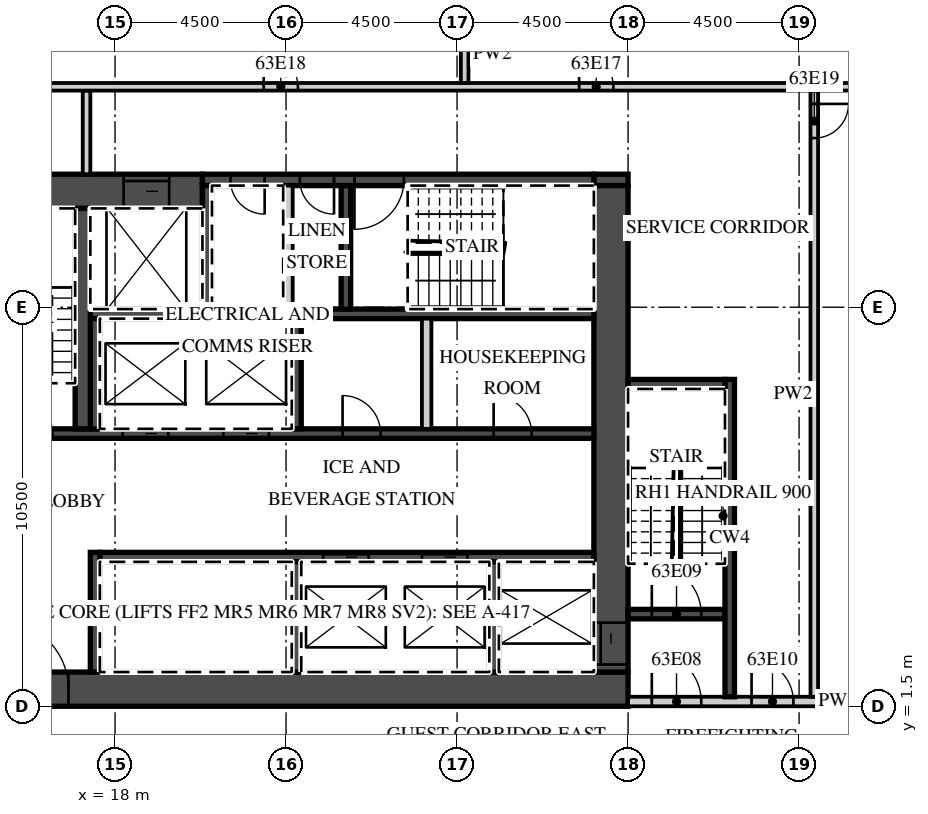
"""IFC4 building model, lengths in metres.
Left out: names, types, materials, properties, quantities, classifications, styles, units other than length and angle.
Written with IfcOpenShell. Run it as: python <this file> out.ifc"""

import sys

from ifc_helpers import new_model, si_unit, direction, frame, frame_2d, origin, place, context, subcontext, project, spatial, rectangle, extrude, element, fill, save


model = new_model("IFC4")
c1 = context("Model", 3, precision=1e-05, world=origin(), true_north=direction((0.0, 1.0)))
c2 = subcontext(c1, "Body", "Model", "MODEL_VIEW")
j1 = project(units=[si_unit("LENGTHUNIT", "METRE"), si_unit("PLANEANGLEUNIT", "RADIAN")], contexts=[c1])
p1 = place(None, origin())
s1 = spatial("IfcSite", under=j1, at=p1, CompositionType="ELEMENT")
p2 = place(p1, origin())
s2 = spatial("IfcBuilding", under=s1, at=p2, CompositionType="ELEMENT")
p3 = place(p2, frame((0.0, 0.0, 254.0)))
s3 = spatial("IfcBuildingStorey", under=s2, at=p3, CompositionType="ELEMENT", Elevation=254.0)
p4 = place(p3, frame((13.5, 1.95, 0.0), z_axis=(0.0, 0.0, 1.0), x_axis=(1.0, 0.0, 0.0)))
e1 = element("IfcWall", 1, at=p4, inside=s3, PredefinedType="SHEAR", context=c2, shape_type="SweptSolid", body=[
    extrude(rectangle(XDim=18.0, YDim=0.9, at=frame_2d((9.0, 0.0))), origin(), (0.0, 0.0, 1.0), 3.0),
])
p5 = place(p4, frame((1.475, 0.0, 0.0)))
e2 = element("IfcOpeningElement", 2, at=p5, cuts=e1, PredefinedType="OPENING", context=c2, shape_type="SweptSolid", body=[
    extrude(rectangle(XDim=1.8, YDim=2.1, at=frame_2d((0.9, 1.05))), frame((0.0, 0.46, 0.0), z_axis=(0.0, -1.0, 0.0), x_axis=(1.0, 0.0, 0.0)), (0.0, 0.0, 1.0), 0.92),
])
p6 = place(p3, frame((13.5, 15.05, 0.0), z_axis=(0.0, 0.0, 1.0), x_axis=(1.0, 0.0, 0.0)))
e3 = element("IfcWall", 3, at=p6, inside=s3, PredefinedType="SHEAR", context=c2, shape_type="SweptSolid", body=[
    extrude(rectangle(XDim=6.8, YDim=0.9, at=frame_2d((3.4, 0.0))), origin(), (0.0, 0.0, 1.0), 3.0),
])
p7 = place(p6, frame((4.725, 0.0, 0.0)))
e4 = element("IfcOpeningElement", 4, at=p7, cuts=e3, PredefinedType="OPENING", context=c2, shape_type="SweptSolid", body=[
    extrude(rectangle(XDim=1.2, YDim=2.1, at=frame_2d((0.6, 1.05))), frame((0.0, 0.46, 0.0), z_axis=(0.0, -1.0, 0.0), x_axis=(1.0, 0.0, 0.0)), (0.0, 0.0, 1.0), 0.92),
])
p8 = place(p3, frame((30.6, 15.35, 0.0), z_axis=(0.0, 0.0, 1.0), x_axis=(1.0, 0.0, 0.0)))
e5 = element("IfcWall", 5, at=p8, inside=s3, PredefinedType="SHEAR", context=c2, shape_type="SweptSolid", body=[
    extrude(rectangle(XDim=0.9, YDim=0.3, at=frame_2d((0.45, 0.0))), origin(), (0.0, 0.0, 1.0), 3.0),
])
p9 = place(p3, frame((20.3, 15.35, 0.0), z_axis=(0.0, 0.0, 1.0), x_axis=(1.0, 0.0, 0.0)))
e6 = element("IfcWall", 6, at=p9, inside=s3, PredefinedType="SHEAR", context=c2, shape_type="SweptSolid", body=[
    extrude(rectangle(XDim=10.3, YDim=0.3, at=frame_2d((5.15, 0.0))), origin(), (0.0, 0.0, 1.0), 3.0),
])
p10 = place(p9, frame((4.0, 0.0, 0.0)))
e7 = element("IfcOpeningElement", 7, at=p10, cuts=e6, PredefinedType="OPENING", context=c2, shape_type="SweptSolid", body=[
    extrude(rectangle(XDim=1.3, YDim=2.1, at=frame_2d((0.65, 1.05))), frame((0.0, 0.16, 0.0), z_axis=(0.0, -1.0, 0.0), x_axis=(1.0, 0.0, 0.0)), (0.0, 0.0, 1.0), 0.32),
])
p11 = place(p9, frame((2.562, 0.0, 0.0)))
e8 = element("IfcOpeningElement", 8, at=p11, cuts=e6, PredefinedType="OPENING", context=c2, shape_type="SweptSolid", body=[
    extrude(rectangle(XDim=0.9, YDim=2.1, at=frame_2d((0.45, 1.05))), frame((0.0, 0.16, 0.0), z_axis=(0.0, -1.0, 0.0), x_axis=(1.0, 0.0, 0.0)), (0.0, 0.0, 1.0), 0.32),
])
p12 = place(p9, frame((0.738, 0.0, 0.0)))
e9 = element("IfcOpeningElement", 9, at=p12, cuts=e6, PredefinedType="OPENING", context=c2, shape_type="SweptSolid", body=[
    extrude(rectangle(XDim=0.9, YDim=2.1, at=frame_2d((0.45, 1.05))), frame((0.0, 0.16, 0.0), z_axis=(0.0, -1.0, 0.0), x_axis=(1.0, 0.0, 0.0)), (0.0, 0.0, 1.0), 0.32),
])
p13 = place(p3, frame((31.05, 2.4, 0.0), z_axis=(0.0, 0.0, 1.0), x_axis=(0.0, 1.0, 0.0)))
e10 = element("IfcWall", 10, at=p13, inside=s3, PredefinedType="SHEAR", context=c2, shape_type="SweptSolid", body=[
    extrude(rectangle(XDim=12.8, YDim=0.9, at=frame_2d((6.4, 0.0))), origin(), (0.0, 0.0, 1.0), 3.0),
])
p14 = place(p13, frame((0.2, 0.0, 0.0)))
e11 = element("IfcOpeningElement", 11, at=p14, cuts=e10, PredefinedType="OPENING", context=c2, shape_type="SweptSolid", body=[
    extrude(rectangle(XDim=1.1, YDim=2.1, at=frame_2d((0.55, 1.05))), frame((0.0, 0.46, 0.0), z_axis=(0.0, -1.0, 0.0), x_axis=(1.0, 0.0, 0.0)), (0.0, 0.0, 1.0), 0.92),
])
p15 = place(p3, frame((17.6, 5.425, 0.0), z_axis=(0.0, 0.0, 1.0), x_axis=(1.0, 0.0, 0.0)))
e12 = element("IfcWall", 12, at=p15, inside=s3, PredefinedType="SHEAR", context=c2, shape_type="SweptSolid", body=[
    extrude(rectangle(XDim=13.0, YDim=0.25, at=frame_2d((6.5, 0.0))), origin(), (0.0, 0.0, 1.0), 3.0),
])
p16 = place(p15, frame((8.475, 0.0, 0.0)))
e13 = element("IfcOpeningElement", 13, at=p16, cuts=e12, PredefinedType="OPENING", context=c2, shape_type="SweptSolid", body=[
    extrude(rectangle(XDim=1.2, YDim=2.1, at=frame_2d((0.6, 1.05))), frame((0.0, 0.135, 0.0), z_axis=(0.0, -1.0, 0.0), x_axis=(1.0, 0.0, 0.0)), (0.0, 0.0, 1.0), 0.27),
])
p17 = place(p15, frame((5.875, 0.0, 0.0)))
e14 = element("IfcOpeningElement", 14, at=p17, cuts=e12, PredefinedType="OPENING", context=c2, shape_type="SweptSolid", body=[
    extrude(rectangle(XDim=1.2, YDim=2.1, at=frame_2d((0.6, 1.05))), frame((0.0, 0.135, 0.0), z_axis=(0.0, -1.0, 0.0), x_axis=(1.0, 0.0, 0.0)), (0.0, 0.0, 1.0), 0.27),
])
p18 = place(p3, frame((17.475, 2.4, 0.0), z_axis=(0.0, 0.0, 1.0), x_axis=(0.0, 1.0, 0.0)))
e15 = element("IfcWall", 15, at=p18, inside=s3, PredefinedType="SHEAR", context=c2, shape_type="SweptSolid", body=[
    extrude(rectangle(XDim=3.15, YDim=0.25, at=frame_2d((1.575, 0.0))), origin(), (0.0, 0.0, 1.0), 3.0),
])
for number, where, z_axis, x_axis in (
    (16, (27.975, 2.4, 0.0), (0.0, 0.0, 1.0), (0.0, 1.0, 0.0)),
    (17, (22.775, 2.4, 0.0), (0.0, 0.0, 1.0), (0.0, 1.0, 0.0)),
):
    element("IfcWall", number, at=place(p3, frame(where, z_axis=z_axis, x_axis=x_axis)), inside=s3, PredefinedType="SHEAR", context=c2, shape_type="SweptSolid", body=[
        extrude(rectangle(XDim=2.9, YDim=0.25, at=frame_2d((1.45, 0.0))), origin(), (0.0, 0.0, 1.0), 3.0),
    ])
p19 = place(p3, frame((14.4, 8.675, 0.0), z_axis=(0.0, 0.0, 1.0), x_axis=(1.0, 0.0, 0.0)))
e18 = element("IfcWall", 18, at=p19, inside=s3, PredefinedType="SHEAR", context=c2, shape_type="SweptSolid", body=[
    extrude(rectangle(XDim=16.2, YDim=0.25, at=frame_2d((8.1, 0.0))), origin(), (0.0, 0.0, 1.0), 3.0),
])
p20 = place(p19, frame((6.45, 0.0, 0.0)))
e19 = element("IfcOpeningElement", 19, at=p20, cuts=e18, PredefinedType="OPENING", context=c2, shape_type="SweptSolid", body=[
    extrude(rectangle(XDim=1.2, YDim=2.1, at=frame_2d((0.6, 1.05))), frame((0.0, 0.135, 0.0), z_axis=(0.0, -1.0, 0.0), x_axis=(1.0, 0.0, 0.0)), (0.0, 0.0, 1.0), 0.27),
])
p21 = place(p19, frame((3.8, 0.0, 0.0)))
e20 = element("IfcOpeningElement", 20, at=p21, cuts=e18, PredefinedType="OPENING", context=c2, shape_type="SweptSolid", body=[
    extrude(rectangle(XDim=1.2, YDim=2.1, at=frame_2d((0.6, 1.05))), frame((0.0, 0.135, 0.0), z_axis=(0.0, -1.0, 0.0), x_axis=(1.0, 0.0, 0.0)), (0.0, 0.0, 1.0), 0.27),
])
p22 = place(p19, frame((0.65, 0.0, 0.0)))
e21 = element("IfcOpeningElement", 21, at=p22, cuts=e18, PredefinedType="OPENING", context=c2, shape_type="SweptSolid", body=[
    extrude(rectangle(XDim=1.3, YDim=2.1, at=frame_2d((0.65, 1.05))), frame((0.0, 0.135, 0.0), z_axis=(0.0, -1.0, 0.0), x_axis=(1.0, 0.0, 0.0)), (0.0, 0.0, 1.0), 0.27),
])
p23 = place(p19, frame((13.562, 0.0, 0.0)))
e22 = element("IfcOpeningElement", 22, at=p23, cuts=e18, PredefinedType="OPENING", context=c2, shape_type="SweptSolid", body=[
    extrude(rectangle(XDim=1.0, YDim=2.1, at=frame_2d((0.5, 1.05))), frame((0.0, 0.135, 0.0), z_axis=(0.0, -1.0, 0.0), x_axis=(1.0, 0.0, 0.0)), (0.0, 0.0, 1.0), 0.27),
])
p24 = place(p19, frame((9.587, 0.0, 0.0)))
e23 = element("IfcOpeningElement", 23, at=p24, cuts=e18, PredefinedType="OPENING", context=c2, shape_type="SweptSolid", body=[
    extrude(rectangle(XDim=1.0, YDim=2.1, at=frame_2d((0.5, 1.05))), frame((0.0, 0.135, 0.0), z_axis=(0.0, -1.0, 0.0), x_axis=(1.0, 0.0, 0.0)), (0.0, 0.0, 1.0), 0.27),
])
p25 = place(p3, frame((17.35, 11.825, 0.0), z_axis=(0.0, 0.0, 1.0), x_axis=(1.0, 0.0, 0.0)))
e24 = element("IfcWall", 24, at=p25, inside=s3, PredefinedType="SHEAR", context=c2, shape_type="SweptSolid", body=[
    extrude(rectangle(XDim=13.25, YDim=0.25, at=frame_2d((6.625, 0.0))), origin(), (0.0, 0.0, 1.0), 3.0),
])
for number, where, z_axis, x_axis in (
    (25, (17.475, 8.8, 0.0), (0.0, 0.0, 1.0), (0.0, 1.0, 0.0)),
    (26, (22.775, 8.8, 0.0), (0.0, 0.0, 1.0), (0.0, 1.0, 0.0)),
):
    element("IfcWall", number, at=place(p3, frame(where, z_axis=z_axis, x_axis=x_axis)), inside=s3, PredefinedType="SHEAR", context=c2, shape_type="SweptSolid", body=[
        extrude(rectangle(XDim=2.9, YDim=0.25, at=frame_2d((1.45, 0.0))), origin(), (0.0, 0.0, 1.0), 3.0),
    ])
p26 = place(p3, frame((26.2, 8.8, 0.0), z_axis=(0.0, 0.0, 1.0), x_axis=(0.0, 1.0, 0.0)))
e27 = element("IfcWall", 27, at=p26, inside=s3, PredefinedType="PARTITIONING", context=c2, shape_type="SweptSolid", body=[
    extrude(rectangle(XDim=2.9, YDim=0.25, at=frame_2d((1.45, 0.0))), origin(), (0.0, 0.0, 1.0), 3.0),
])
p27 = place(p3, frame((17.15, 8.8, 0.0), z_axis=(0.0, 0.0, 1.0), x_axis=(0.0, 1.0, 0.0)))
e28 = element("IfcWall", 28, at=p27, inside=s3, PredefinedType="SHEAR", context=c2, shape_type="SweptSolid", body=[
    extrude(rectangle(XDim=5.8, YDim=0.4, at=frame_2d((2.9, 0.0))), origin(), (0.0, 0.0, 1.0), 3.0),
])
for number, where, z_axis, x_axis in (
    (29, (20.425, 11.95, 0.0), (0.0, 0.0, 1.0), (0.0, 1.0, 0.0)),
    (30, (24.075, 11.95, 0.0), (0.0, 0.0, 1.0), (0.0, 1.0, 0.0)),
):
    element("IfcWall", number, at=place(p3, frame(where, z_axis=z_axis, x_axis=x_axis)), inside=s3, PredefinedType="SHEAR", context=c2, shape_type="SweptSolid", body=[
        extrude(rectangle(XDim=3.25, YDim=0.25, at=frame_2d((1.625, 0.0))), origin(), (0.0, 0.0, 1.0), 3.0),
    ])
p28 = place(p3, frame((22.55, 11.95, 0.0), z_axis=(0.0, 0.0, 1.0), x_axis=(0.0, 1.0, 0.0)))
e31 = element("IfcWall", 31, at=p28, inside=s3, PredefinedType="PARTITIONING", context=c2, shape_type="SweptSolid", body=[
    extrude(rectangle(XDim=3.25, YDim=0.25, at=frame_2d((1.625, 0.0))), origin(), (0.0, 0.0, 1.0), 3.0),
])
p29 = place(p3, frame((31.5, 1.625, 0.0), z_axis=(0.0, 0.0, 1.0), x_axis=(1.0, 0.0, 0.0)))
e32 = element("IfcWall", 32, at=p29, inside=s3, PredefinedType="PARTITIONING", context=c2, shape_type="SweptSolid", body=[
    extrude(rectangle(XDim=11.04, YDim=0.25, at=frame_2d((5.52, 0.0))), origin(), (0.0, 0.0, 1.0), 3.0),
])
p30 = place(p29, frame((0.625, 0.0, 0.0)))
e33 = element("IfcOpeningElement", 33, at=p30, cuts=e32, PredefinedType="OPENING", context=c2, shape_type="SweptSolid", body=[
    extrude(rectangle(XDim=1.3, YDim=2.1, at=frame_2d((0.65, 1.05))), frame((0.0, 0.135, 0.0), z_axis=(0.0, -1.0, 0.0), x_axis=(1.0, 0.0, 0.0)), (0.0, 0.0, 1.0), 0.27),
])
p31 = place(p29, frame((3.25, 0.0, 0.0)))
e34 = element("IfcOpeningElement", 34, at=p31, cuts=e32, PredefinedType="OPENING", context=c2, shape_type="SweptSolid", body=[
    extrude(rectangle(XDim=1.1, YDim=2.1, at=frame_2d((0.55, 1.05))), frame((0.0, 0.135, 0.0), z_axis=(0.0, -1.0, 0.0), x_axis=(1.0, 0.0, 0.0)), (0.0, 0.0, 1.0), 0.27),
])
p32 = place(p3, frame((31.5, 3.925, 0.0), z_axis=(0.0, 0.0, 1.0), x_axis=(1.0, 0.0, 0.0)))
e35 = element("IfcWall", 35, at=p32, inside=s3, PredefinedType="SHEAR", context=c2, shape_type="SweptSolid", body=[
    extrude(rectangle(XDim=2.55, YDim=0.25, at=frame_2d((1.275, 0.0))), origin(), (0.0, 0.0, 1.0), 3.0),
])
p33 = place(p32, frame((0.625, 0.0, 0.0)))
e36 = element("IfcOpeningElement", 36, at=p33, cuts=e35, PredefinedType="OPENING", context=c2, shape_type="SweptSolid", body=[
    extrude(rectangle(XDim=1.3, YDim=2.1, at=frame_2d((0.65, 1.05))), frame((0.0, 0.135, 0.0), z_axis=(0.0, -1.0, 0.0), x_axis=(1.0, 0.0, 0.0)), (0.0, 0.0, 1.0), 0.27),
])
p34 = place(p3, frame((34.175, 1.75, 0.0), z_axis=(0.0, 0.0, 1.0), x_axis=(0.0, 1.0, 0.0)))
e37 = element("IfcWall", 37, at=p34, inside=s3, PredefinedType="SHEAR", context=c2, shape_type="SweptSolid", body=[
    extrude(rectangle(XDim=8.35, YDim=0.25, at=frame_2d((4.175, 0.0))), origin(), (0.0, 0.0, 1.0), 3.0),
])
p35 = place(p3, frame((31.5, 9.975, 0.0), z_axis=(0.0, 0.0, 1.0), x_axis=(1.0, 0.0, 0.0)))
e38 = element("IfcWall", 38, at=p35, inside=s3, PredefinedType="SHEAR", context=c2, shape_type="SweptSolid", body=[
    extrude(rectangle(XDim=2.55, YDim=0.25, at=frame_2d((1.275, 0.0))), origin(), (0.0, 0.0, 1.0), 3.0),
])
p36 = place(p3, frame((17.25, 15.5, 0.0), z_axis=(0.0, 0.0, 1.0), x_axis=(0.0, 1.0, 0.0)))
e39 = element("IfcWall", 39, at=p36, inside=s3, PredefinedType="PARTITIONING", context=c2, shape_type="SweptSolid", body=[
    extrude(rectangle(XDim=2.2, YDim=0.2, at=frame_2d((1.1, 0.0))), origin(), (0.0, 0.0, 1.0), 3.0),
])
p37 = place(p3, frame((36.4, 1.75, 0.0), z_axis=(0.0, 0.0, 1.0), x_axis=(0.0, 1.0, 0.0)))
e40 = element("IfcWall", 40, at=p37, inside=s3, PredefinedType="PARTITIONING", context=c2, shape_type="SweptSolid", body=[
    extrude(rectangle(XDim=15.95, YDim=0.2, at=frame_2d((7.975, 0.0))), origin(), (0.0, 0.0, 1.0), 3.0),
])
p38 = place(p37, frame((14.7, 0.0, 0.0)))
e41 = element("IfcOpeningElement", 41, at=p38, cuts=e40, PredefinedType="OPENING", context=c2, shape_type="SweptSolid", body=[
    extrude(rectangle(XDim=0.9, YDim=2.1, at=frame_2d((0.45, 1.05))), frame((0.0, 0.11, 0.0), z_axis=(0.0, -1.0, 0.0), x_axis=(1.0, 0.0, 0.0)), (0.0, 0.0, 1.0), 0.22),
])
p39 = place(p3, frame((13.6, 17.8, 0.0), z_axis=(0.0, 0.0, 1.0), x_axis=(1.0, 0.0, 0.0)))
e42 = element("IfcWall", 42, at=p39, inside=s3, PredefinedType="PARTITIONING", context=c2, shape_type="SweptSolid", body=[
    extrude(rectangle(XDim=28.657, YDim=0.2, at=frame_2d((14.329, 0.0))), origin(), (0.0, 0.0, 1.0), 3.0),
])
p40 = place(p39, frame((16.613, 0.0, 0.0)))
e43 = element("IfcOpeningElement", 43, at=p40, cuts=e42, PredefinedType="OPENING", context=c2, shape_type="SweptSolid", body=[
    extrude(rectangle(XDim=0.9, YDim=2.1, at=frame_2d((0.45, 1.05))), frame((0.0, 0.11, 0.0), z_axis=(0.0, -1.0, 0.0), x_axis=(1.0, 0.0, 0.0)), (0.0, 0.0, 1.0), 0.22),
])
p41 = place(p39, frame((8.312, 0.0, 0.0)))
e44 = element("IfcOpeningElement", 44, at=p41, cuts=e42, PredefinedType="OPENING", context=c2, shape_type="SweptSolid", body=[
    extrude(rectangle(XDim=0.9, YDim=2.1, at=frame_2d((0.45, 1.05))), frame((0.0, 0.11, 0.0), z_axis=(0.0, -1.0, 0.0), x_axis=(1.0, 0.0, 0.0)), (0.0, 0.0, 1.0), 0.22),
])
p42 = place(p3, frame((27.2, 17.9, 0.0), z_axis=(0.0, 0.0, 1.0), x_axis=(0.0, 1.0, 0.0)))
e45 = element("IfcWall", 45, at=p42, inside=s3, PredefinedType="PARTITIONING", context=c2, shape_type="SweptSolid", body=[
    extrude(rectangle(XDim=3.276, YDim=0.2, at=frame_2d((1.638, 0.0))), origin(), (0.0, 0.0, 1.0), 3.0),
])
p43 = place(p20, origin())
e46 = element("IfcDoor", 46, at=p43, inside=s3, OperationType="SLIDING_TO_LEFT", PredefinedType="DOOR", context=c2, shape_type="SweptSolid", body=[
    extrude(rectangle(XDim=1.2, YDim=2.1, at=frame_2d((0.6, 1.05))), frame((0.0, 0.025, 0.0), z_axis=(0.0, -1.0, 0.0), x_axis=(1.0, 0.0, 0.0)), (0.0, 0.0, 1.0), 0.05),
])
fill(e19, e46)
p44 = place(p21, origin())
e47 = element("IfcDoor", 47, at=p44, inside=s3, OperationType="SLIDING_TO_RIGHT", PredefinedType="DOOR", context=c2, shape_type="SweptSolid", body=[
    extrude(rectangle(XDim=1.2, YDim=2.1, at=frame_2d((0.6, 1.05))), frame((0.0, 0.025, 0.0), z_axis=(0.0, -1.0, 0.0), x_axis=(1.0, 0.0, 0.0)), (0.0, 0.0, 1.0), 0.05),
])
fill(e20, e47)
p45 = place(p16, origin())
e48 = element("IfcDoor", 48, at=p45, inside=s3, OperationType="SLIDING_TO_LEFT", PredefinedType="DOOR", context=c2, shape_type="SweptSolid", body=[
    extrude(rectangle(XDim=1.2, YDim=2.1, at=frame_2d((0.6, 1.05))), frame((0.0, 0.025, 0.0), z_axis=(0.0, -1.0, 0.0), x_axis=(1.0, 0.0, 0.0)), (0.0, 0.0, 1.0), 0.05),
])
fill(e13, e48)
p46 = place(p17, origin())
e49 = element("IfcDoor", 49, at=p46, inside=s3, OperationType="SLIDING_TO_RIGHT", PredefinedType="DOOR", context=c2, shape_type="SweptSolid", body=[
    extrude(rectangle(XDim=1.2, YDim=2.1, at=frame_2d((0.6, 1.05))), frame((0.0, 0.025, 0.0), z_axis=(0.0, -1.0, 0.0), x_axis=(1.0, 0.0, 0.0)), (0.0, 0.0, 1.0), 0.05),
])
fill(e14, e49)
p47 = place(p7, origin())
e50 = element("IfcDoor", 50, at=p47, inside=s3, OperationType="SLIDING_TO_LEFT", PredefinedType="DOOR", context=c2, shape_type="SweptSolid", body=[
    extrude(rectangle(XDim=1.2, YDim=2.1, at=frame_2d((0.6, 1.05))), frame((0.0, 0.025, 0.0), z_axis=(0.0, -1.0, 0.0), x_axis=(1.0, 0.0, 0.0)), (0.0, 0.0, 1.0), 0.05),
])
fill(e4, e50)
p48 = place(p14, origin())
e51 = element("IfcDoor", 51, at=p48, inside=s3, OperationType="SLIDING_TO_LEFT", PredefinedType="DOOR", context=c2, shape_type="SweptSolid", body=[
    extrude(rectangle(XDim=1.1, YDim=2.1, at=frame_2d((0.55, 1.05))), frame((0.0, 0.025, 0.0), z_axis=(0.0, -1.0, 0.0), x_axis=(1.0, 0.0, 0.0)), (0.0, 0.0, 1.0), 0.05),
])
fill(e11, e51)
p49 = place(p5, origin())
e52 = element("IfcDoor", 52, at=p49, inside=s3, OperationType="DOUBLE_DOOR_DOUBLE_SWING", PredefinedType="DOOR", context=c2, shape_type="SweptSolid", body=[
    extrude(rectangle(XDim=1.8, YDim=2.1, at=frame_2d((0.9, 1.05))), frame((0.0, 0.025, 0.0), z_axis=(0.0, -1.0, 0.0), x_axis=(1.0, 0.0, 0.0)), (0.0, 0.0, 1.0), 0.05),
])
fill(e2, e52)
p50 = place(p30, origin())
e53 = element("IfcDoor", 53, at=p50, inside=s3, OperationType="SINGLE_SWING_LEFT", PredefinedType="DOOR", context=c2, shape_type="SweptSolid", body=[
    extrude(rectangle(XDim=1.3, YDim=2.1, at=frame_2d((0.65, 1.05))), frame((0.0, 0.025, 0.0), z_axis=(0.0, -1.0, 0.0), x_axis=(1.0, 0.0, 0.0)), (0.0, 0.0, 1.0), 0.05),
])
fill(e33, e53)
p51 = place(p33, origin())
e54 = element("IfcDoor", 54, at=p51, inside=s3, OperationType="SINGLE_SWING_LEFT", PredefinedType="DOOR", context=c2, shape_type="SweptSolid", body=[
    extrude(rectangle(XDim=1.3, YDim=2.1, at=frame_2d((0.65, 1.05))), frame((0.0, 0.025, 0.0), z_axis=(0.0, -1.0, 0.0), x_axis=(1.0, 0.0, 0.0)), (0.0, 0.0, 1.0), 0.05),
])
fill(e36, e54)
p52 = place(p31, origin())
e55 = element("IfcDoor", 55, at=p52, inside=s3, OperationType="SINGLE_SWING_LEFT", PredefinedType="DOOR", context=c2, shape_type="SweptSolid", body=[
    extrude(rectangle(XDim=1.1, YDim=2.1, at=frame_2d((0.55, 1.05))), frame((0.0, 0.025, 0.0), z_axis=(0.0, -1.0, 0.0), x_axis=(1.0, 0.0, 0.0)), (0.0, 0.0, 1.0), 0.05),
])
fill(e34, e55)
p53 = place(p10, origin())
e56 = element("IfcDoor", 56, at=p53, inside=s3, OperationType="SINGLE_SWING_LEFT", PredefinedType="DOOR", context=c2, shape_type="SweptSolid", body=[
    extrude(rectangle(XDim=1.3, YDim=2.1, at=frame_2d((0.65, 1.05))), frame((0.0, 0.025, 0.0), z_axis=(0.0, -1.0, 0.0), x_axis=(1.0, 0.0, 0.0)), (0.0, 0.0, 1.0), 0.05),
])
fill(e7, e56)
p54 = place(p11, origin())
e57 = element("IfcDoor", 57, at=p54, inside=s3, OperationType="SINGLE_SWING_RIGHT", PredefinedType="DOOR", context=c2, shape_type="SweptSolid", body=[
    extrude(rectangle(XDim=0.9, YDim=2.1, at=frame_2d((0.45, 1.05))), frame((0.0, 0.025, 0.0), z_axis=(0.0, -1.0, 0.0), x_axis=(1.0, 0.0, 0.0)), (0.0, 0.0, 1.0), 0.05),
])
fill(e8, e57)
p55 = place(p12, origin())
e58 = element("IfcDoor", 58, at=p55, inside=s3, OperationType="SINGLE_SWING_RIGHT", PredefinedType="DOOR", context=c2, shape_type="SweptSolid", body=[
    extrude(rectangle(XDim=0.9, YDim=2.1, at=frame_2d((0.45, 1.05))), frame((0.0, 0.025, 0.0), z_axis=(0.0, -1.0, 0.0), x_axis=(1.0, 0.0, 0.0)), (0.0, 0.0, 1.0), 0.05),
])
fill(e9, e58)
p56 = place(p23, origin())
e59 = element("IfcDoor", 59, at=p56, inside=s3, OperationType="SINGLE_SWING_LEFT", PredefinedType="DOOR", context=c2, shape_type="SweptSolid", body=[
    extrude(rectangle(XDim=1.0, YDim=2.1, at=frame_2d((0.5, 1.05))), frame((0.0, 0.025, 0.0), z_axis=(0.0, -1.0, 0.0), x_axis=(1.0, 0.0, 0.0)), (0.0, 0.0, 1.0), 0.05),
])
fill(e22, e59)
p57 = place(p24, origin())
e60 = element("IfcDoor", 60, at=p57, inside=s3, OperationType="SINGLE_SWING_LEFT", PredefinedType="DOOR", context=c2, shape_type="SweptSolid", body=[
    extrude(rectangle(XDim=1.0, YDim=2.1, at=frame_2d((0.5, 1.05))), frame((0.0, 0.025, 0.0), z_axis=(0.0, -1.0, 0.0), x_axis=(1.0, 0.0, 0.0)), (0.0, 0.0, 1.0), 0.05),
])
fill(e23, e60)
p58 = place(p40, origin())
e61 = element("IfcDoor", 61, at=p58, inside=s3, OperationType="SINGLE_SWING_LEFT", PredefinedType="DOOR", context=c2, shape_type="SweptSolid", body=[
    extrude(rectangle(XDim=0.9, YDim=2.1, at=frame_2d((0.45, 1.05))), frame((0.0, 0.025, 0.0), z_axis=(0.0, -1.0, 0.0), x_axis=(1.0, 0.0, 0.0)), (0.0, 0.0, 1.0), 0.05),
])
fill(e43, e61)
p59 = place(p41, origin())
e62 = element("IfcDoor", 62, at=p59, inside=s3, OperationType="SINGLE_SWING_LEFT", PredefinedType="DOOR", context=c2, shape_type="SweptSolid", body=[
    extrude(rectangle(XDim=0.9, YDim=2.1, at=frame_2d((0.45, 1.05))), frame((0.0, 0.025, 0.0), z_axis=(0.0, -1.0, 0.0), x_axis=(1.0, 0.0, 0.0)), (0.0, 0.0, 1.0), 0.05),
])
fill(e44, e62)
p60 = place(p38, origin())
e63 = element("IfcDoor", 63, at=p60, inside=s3, OperationType="SINGLE_SWING_RIGHT", PredefinedType="DOOR", context=c2, shape_type="SweptSolid", body=[
    extrude(rectangle(XDim=0.9, YDim=2.1, at=frame_2d((0.45, 1.05))), frame((0.0, 0.025, 0.0), z_axis=(0.0, -1.0, 0.0), x_axis=(1.0, 0.0, 0.0)), (0.0, 0.0, 1.0), 0.05),
])
fill(e41, e63)
save(model, sys.argv[1])
